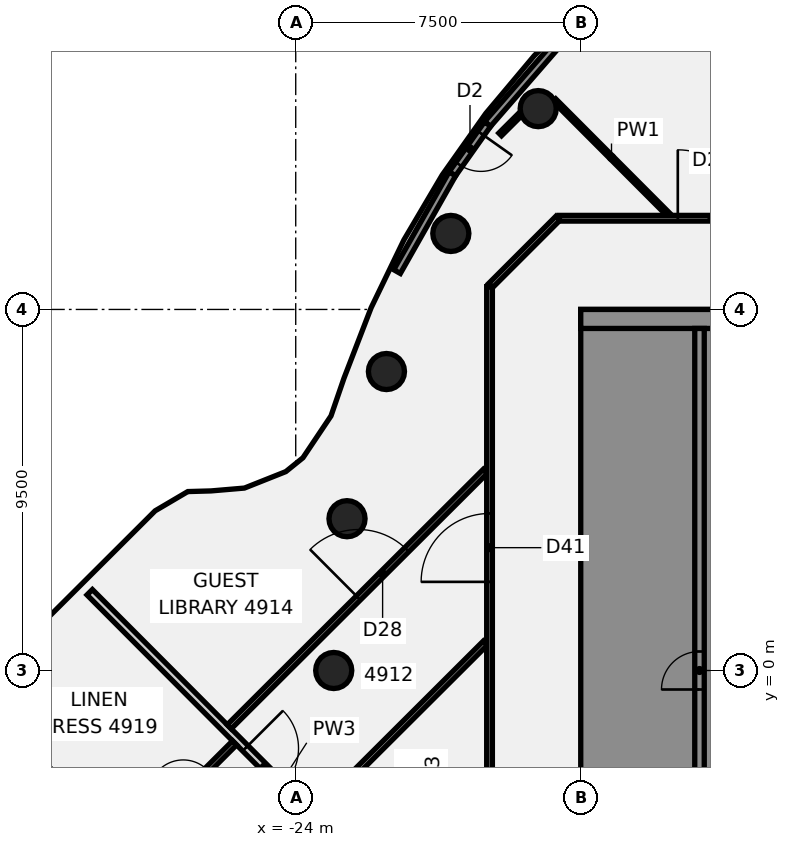
"""IFC4 building model, lengths in metres.
Left out: names, types, materials, properties, quantities, classifications, styles, units other than length and angle.
Written with IfcOpenShell. Run it as: python <this file> out.ifc"""

import sys

from ifc_helpers import new_model, si_unit, direction, frame, frame_2d, origin, origin_2d, place, context, subcontext, project, spatial, polyline, rectangle, circle, outline, extrude, element, fill, save


model = new_model("IFC4")
c1 = context("Model", 3, precision=1e-05, world=origin(), true_north=direction((0.0, 1.0)))
c2 = subcontext(c1, "Body", "Model", "MODEL_VIEW")
j1 = project(units=[si_unit("LENGTHUNIT", "METRE"), si_unit("PLANEANGLEUNIT", "RADIAN")], contexts=[c1])
p1 = place(None, origin())
s1 = spatial("IfcSite", under=j1, at=p1, CompositionType="ELEMENT")
p2 = place(p1, origin())
s2 = spatial("IfcBuilding", under=s1, at=p2, CompositionType="ELEMENT")
p3 = place(p2, frame((0.0, 0.0, 196.9)))
s3 = spatial("IfcBuildingStorey", under=s2, at=p3, CompositionType="ELEMENT", Elevation=196.9)
for number, where, z_axis, x_axis in (
    (1, (-17.619, 14.784, -0.14), (0.0, 0.0, 1.0), (1.0, 0.0, 0.0)),
    (2, (-19.919, 11.5, -0.14), (0.0, 0.0, 1.0), (1.0, 0.0, 0.0)),
    (3, (-21.613, 7.866, -0.14), (0.0, 0.0, 1.0), (1.0, 0.0, 0.0)),
    (4, (-22.651, 3.994, -0.14), (0.0, 0.0, 1.0), (1.0, 0.0, 0.0)),
    (5, (-23.0, 0.0, -0.14), (0.0, 0.0, 1.0), (1.0, 0.0, 0.0)),
):
    element("IfcColumn", number, at=place(p3, frame(where, z_axis=z_axis, x_axis=x_axis)), inside=s3, PredefinedType="COLUMN", context=c2, shape_type="SweptSolid", body=[
        extrude(circle(Radius=0.475, at=origin_2d()), origin(), (0.0, 0.0, 1.0), 3.6),
    ])
p4 = place(p3, frame((-29.421, 2.059, 0.0), z_axis=(0.0, 0.0, 1.0), x_axis=(0.706204778192, -0.708007635029, 0.0)))
e6 = element("IfcWall", 6, at=p4, inside=s3, PredefinedType="PARTITIONING", context=c2, shape_type="SweptSolid", body=[
    extrude(rectangle(XDim=14.219, YDim=0.2, at=frame_2d((7.109, 0.0))), origin(), (0.0, 0.0, 1.0), 2.864),
])
p5 = place(p4, frame((5.799, 0.0, 0.0)))
e7 = element("IfcOpeningElement", 7, at=p5, cuts=e6, PredefinedType="OPENING", context=c2, shape_type="SweptSolid", body=[
    extrude(rectangle(XDim=1.4, YDim=2.1, at=frame_2d((0.7, 1.05))), frame((0.0, 0.11, 0.0), z_axis=(0.0, -1.0, 0.0), x_axis=(1.0, 0.0, 0.0)), (0.0, 0.0, 1.0), 0.22),
])
p6 = place(p3, frame((-17.193, 15.006, 0.0), z_axis=(0.0, 0.0, 1.0), x_axis=(0.706159706794, -0.708052588796, 0.0)))
e8 = element("IfcWall", 8, at=p6, inside=s3, PredefinedType="PARTITIONING", context=c2, shape_type="SweptSolid", body=[
    extrude(rectangle(XDim=4.256, YDim=0.1, at=frame_2d((2.128, 0.0))), origin(), (0.0, 0.0, 1.0), 2.864),
])
p7 = place(p3, frame((-17.065, 11.9, 0.0), z_axis=(0.0, 0.0, 1.0), x_axis=(1.0, 0.0, 0.0)))
e9 = element("IfcWall", 9, at=p7, inside=s3, PredefinedType="PARTITIONING", context=c2, shape_type="SweptSolid", body=[
    extrude(rectangle(XDim=34.165, YDim=0.15, at=frame_2d((17.083, 0.0))), origin(), (0.0, 0.0, 1.0), 2.864),
])
p8 = place(p7, frame((24.217, 0.0, 0.0)))
e10 = element("IfcOpeningElement", 10, at=p8, cuts=e9, PredefinedType="OPENING", context=c2, shape_type="SweptSolid", body=[
    extrude(rectangle(XDim=1.8, YDim=2.1, at=frame_2d((0.9, 1.05))), frame((0.0, 0.085, 0.0), z_axis=(0.0, -1.0, 0.0), x_axis=(1.0, 0.0, 0.0)), (0.0, 0.0, 1.0), 0.17),
])
p9 = place(p7, frame((8.819, 0.0, 0.0)))
e11 = element("IfcOpeningElement", 11, at=p9, cuts=e9, PredefinedType="OPENING", context=c2, shape_type="SweptSolid", body=[
    extrude(rectangle(XDim=1.8, YDim=2.1, at=frame_2d((0.9, 1.05))), frame((0.0, 0.085, 0.0), z_axis=(0.0, -1.0, 0.0), x_axis=(1.0, 0.0, 0.0)), (0.0, 0.0, 1.0), 0.17),
])
p10 = place(p7, frame((3.119, 0.0, 0.0)))
e12 = element("IfcOpeningElement", 12, at=p10, cuts=e9, PredefinedType="OPENING", context=c2, shape_type="SweptSolid", body=[
    extrude(rectangle(XDim=1.8, YDim=2.1, at=frame_2d((0.9, 1.05))), frame((0.0, 0.085, 0.0), z_axis=(0.0, -1.0, 0.0), x_axis=(1.0, 0.0, 0.0)), (0.0, 0.0, 1.0), 0.17),
])
p11 = place(p3, frame((-28.341, -4.63, 0.0), z_axis=(0.0, 0.0, 1.0), x_axis=(0.707960220413, 0.70625231066, 0.0)))
e13 = element("IfcWall", 13, at=p11, inside=s3, PredefinedType="PARTITIONING", context=c2, shape_type="SweptSolid", body=[
    extrude(rectangle(XDim=3.86, YDim=0.15, at=frame_2d((1.93, 0.0))), origin(), (0.0, 0.0, 1.0), 2.864),
])
p12 = place(p11, frame((1.95, 0.0, 0.0)))
e14 = element("IfcOpeningElement", 14, at=p12, cuts=e13, PredefinedType="OPENING", context=c2, shape_type="SweptSolid", body=[
    extrude(rectangle(XDim=0.9, YDim=2.1, at=frame_2d((0.45, 1.05))), frame((0.0, 0.085, 0.0), z_axis=(0.0, -1.0, 0.0), x_axis=(1.0, 0.0, 0.0)), (0.0, 0.0, 1.0), 0.17),
])
p13 = place(p3, frame((-25.749, -1.48, 0.0), z_axis=(0.0, 0.0, 1.0), x_axis=(0.707978232656, 0.706234254398, 0.0)))
e15 = element("IfcWall", 15, at=p13, inside=s3, PredefinedType="PARTITIONING", context=c2, shape_type="SweptSolid", body=[
    extrude(rectangle(XDim=9.519, YDim=0.15, at=frame_2d((4.76, 0.0))), origin(), (0.0, 0.0, 1.0), 2.864),
])
p14 = place(p13, frame((4.8, 0.0, 0.0)))
e16 = element("IfcOpeningElement", 16, at=p14, cuts=e15, PredefinedType="OPENING", context=c2, shape_type="SweptSolid", body=[
    extrude(rectangle(XDim=1.8, YDim=2.1, at=frame_2d((0.9, 1.05))), frame((0.0, 0.085, 0.0), z_axis=(0.0, -1.0, 0.0), x_axis=(1.0, 0.0, 0.0)), (0.0, 0.0, 1.0), 0.17),
])
p15 = place(p3, frame((-23.49, -3.745, 0.0), z_axis=(0.0, 0.0, 1.0), x_axis=(0.708089983703, 0.706122209663, 0.0)))
e17 = element("IfcWall", 17, at=p15, inside=s3, PredefinedType="PARTITIONING", context=c2, shape_type="SweptSolid", body=[
    extrude(rectangle(XDim=6.328, YDim=0.15, at=frame_2d((3.164, 0.0))), origin(), (0.0, 0.0, 1.0), 2.864),
])
p16 = place(p3, frame((-18.62, 14.106, 0.0), z_axis=(0.0, 0.0, 1.0), x_axis=(0.708047707123, 0.706164601519, 0.0)))
e18 = element("IfcWall", 18, at=p16, inside=s3, PredefinedType="PARTITIONING", context=c2, shape_type="SweptSolid", body=[
    extrude(rectangle(XDim=0.778, YDim=0.1, at=frame_2d((0.389, 0.0))), origin(), (0.0, 0.0, 1.0), 2.864),
])
p17 = place(p3, frame((-18.872, 10.128, 0.0), z_axis=(0.0, 0.0, 1.0), x_axis=(0.707106781187, 0.707106781187, 0.0)))
e19 = element("IfcWall", 19, at=p17, inside=s3, PredefinedType="PARTITIONING", context=c2, shape_type="SweptSolid", body=[
    extrude(rectangle(XDim=2.505, YDim=0.15, at=frame_2d((1.253, 0.0))), origin(), (0.0, 0.0, 1.0), 2.864),
])
p18 = place(p3, frame((-18.9, -10.1, 0.0), z_axis=(0.0, 0.0, 1.0), x_axis=(0.0, 1.0, 0.0)))
e20 = element("IfcWall", 20, at=p18, inside=s3, PredefinedType="PARTITIONING", context=c2, shape_type="SweptSolid", body=[
    extrude(rectangle(XDim=20.2, YDim=0.15, at=frame_2d((10.1, 0.0))), origin(), (0.0, 0.0, 1.0), 2.864),
])
p19 = place(p18, frame((12.432, 0.0, 0.0)))
e21 = element("IfcOpeningElement", 21, at=p19, cuts=e20, PredefinedType="OPENING", context=c2, shape_type="SweptSolid", body=[
    extrude(rectangle(XDim=1.8, YDim=2.1, at=frame_2d((0.9, 1.05))), frame((0.0, 0.085, 0.0), z_axis=(0.0, -1.0, 0.0), x_axis=(1.0, 0.0, 0.0)), (0.0, 0.0, 1.0), 0.17),
])
p20 = place(p18, frame((5.158, 0.0, 0.0)))
e22 = element("IfcOpeningElement", 22, at=p20, cuts=e20, PredefinedType="OPENING", context=c2, shape_type="SweptSolid", body=[
    extrude(rectangle(XDim=0.9, YDim=2.1, at=frame_2d((0.45, 1.05))), frame((0.0, 0.085, 0.0), z_axis=(0.0, -1.0, 0.0), x_axis=(1.0, 0.0, 0.0)), (0.0, 0.0, 1.0), 0.17),
])
p21 = place(p3, frame((-17.011, 16.611, 0.0), z_axis=(0.0, 0.0, 1.0), x_axis=(-0.65596013701, -0.754795534336, 0.0)))
e23 = element("IfcWall", 23, at=p21, inside=s3, PredefinedType="SOLIDWALL", context=c2, shape_type="SweptSolid", body=[
    extrude(rectangle(XDim=2.959, YDim=0.2, at=frame_2d((1.479, 0.0))), origin(), (0.0, 0.0, 1.0), 3.46),
])
p22 = place(p3, frame((-19.876, 13.071, 0.0), z_axis=(0.0, 0.0, 1.0), x_axis=(-0.492589967899, -0.870261525936, 0.0)))
e24 = element("IfcWall", 24, at=p22, inside=s3, PredefinedType="SOLIDWALL", context=c2, shape_type="SweptSolid", body=[
    extrude(rectangle(XDim=2.959, YDim=0.2, at=frame_2d((1.48, 0.0))), origin(), (0.0, 0.0, 1.0), 3.46),
])
p23 = place(p3, frame((-18.952, 14.377, 0.0), z_axis=(0.0, 0.0, 1.0), x_axis=(-0.57755153974, -0.816354223939, 0.0)))
e25 = element("IfcWall", 25, at=p23, inside=s3, PredefinedType="SOLIDWALL", context=c2, shape_type="SweptSolid", body=[
    extrude(rectangle(XDim=1.6, YDim=0.2, at=frame_2d((0.8, 0.0))), origin(), (0.0, 0.0, 1.0), 3.46),
])
p24 = place(p23, frame((0.3, 0.0, 0.0)))
e26 = element("IfcOpeningElement", 26, at=p24, cuts=e25, PredefinedType="OPENING", context=c2, shape_type="SweptSolid", body=[
    extrude(rectangle(XDim=1.0, YDim=2.4, at=frame_2d((0.5, 1.2))), frame((0.0, 0.11, 0.0), z_axis=(0.0, -1.0, 0.0), x_axis=(1.0, 0.0, 0.0)), (0.0, 0.0, 1.0), 0.22),
])
p25 = place(p3, origin())
e27 = element("IfcWall", 27, at=p25, inside=s3, PredefinedType="SHEAR", context=c2, shape_type="SweptSolid", body=[
    extrude(outline(polyline([(-13.5, -8.125), (-16.0, -8.125), (-16.0, -5.625), (-13.5, -5.625), (-13.5, -5.375), (-16.0, -5.375), (-16.0, 5.375), (-13.5, 5.375), (-13.5, 5.625), (-16.0, 5.625), (-16.0, 8.125), (-13.5, 8.125), (-13.5, 9.0), (-16.0, 9.0), (-16.5, 9.0), (-16.5, -9.0), (-16.0, -9.0), (-13.5, -9.0), (-13.5, -8.125)])), origin(), (0.0, 0.0, 1.0), 3.46),
])
p26 = place(p3, frame((-16.5, 9.25, 0.0), z_axis=(0.0, 0.0, 1.0), x_axis=(1.0, 0.0, 0.0)))
e28 = element("IfcWall", 28, at=p26, inside=s3, PredefinedType="SHEAR", context=c2, shape_type="SweptSolid", body=[
    extrude(rectangle(XDim=13.0, YDim=0.5, at=frame_2d((6.5, 0.0))), origin(), (0.0, 0.0, 1.0), 3.46),
])
p27 = place(p3, frame((-13.375, -9.0, 0.0), z_axis=(0.0, 0.0, 1.0), x_axis=(0.0, 1.0, 0.0)))
e29 = element("IfcWall", 29, at=p27, inside=s3, PredefinedType="SHEAR", context=c2, shape_type="SweptSolid", body=[
    extrude(rectangle(XDim=18.0, YDim=0.25, at=frame_2d((9.0, 0.0))), origin(), (0.0, 0.0, 1.0), 3.46),
])
p28 = place(p27, frame((1.425, 0.0, 0.0)))
e30 = element("IfcOpeningElement", 30, at=p28, cuts=e29, PredefinedType="OPENING", context=c2, shape_type="SweptSolid", body=[
    extrude(rectangle(XDim=1.4, YDim=2.1, at=frame_2d((0.7, 1.05))), frame((0.0, 0.135, 0.0), z_axis=(0.0, -1.0, 0.0), x_axis=(1.0, 0.0, 0.0)), (0.0, 0.0, 1.0), 0.27),
])
p29 = place(p27, frame((8.5, 0.0, 0.0)))
e31 = element("IfcOpeningElement", 31, at=p29, cuts=e29, PredefinedType="OPENING", context=c2, shape_type="SweptSolid", body=[
    extrude(rectangle(XDim=1.0, YDim=2.1, at=frame_2d((0.5, 1.05))), frame((0.0, 0.135, 0.0), z_axis=(0.0, -1.0, 0.0), x_axis=(1.0, 0.0, 0.0)), (0.0, 0.0, 1.0), 0.27),
])
p30 = place(p3, frame((-30.842, -2.322, -0.14), z_axis=(0.0, 0.0, 1.0), x_axis=(0.706190643127, -0.708021733818, 0.0)))
e32 = element("IfcWall", 32, at=p30, inside=s3, PredefinedType="SHEAR", context=c2, shape_type="SweptSolid", body=[
    extrude(rectangle(XDim=3.2, YDim=0.2, at=frame_2d((1.6, 0.0))), origin(), (0.0, 0.0, 1.0), 3.004),
])
p31 = place(p5, origin())
e33 = element("IfcDoor", 33, at=p31, inside=s3, OperationType="DOUBLE_DOOR_SINGLE_SWING", PredefinedType="DOOR", context=c2, shape_type="SweptSolid", body=[
    extrude(rectangle(XDim=1.4, YDim=2.1, at=frame_2d((0.7, 1.05))), frame((0.0, 0.025, 0.0), z_axis=(0.0, -1.0, 0.0), x_axis=(1.0, 0.0, 0.0)), (0.0, 0.0, 1.0), 0.05),
])
fill(e7, e33)
p32 = place(p10, origin())
e34 = element("IfcDoor", 34, at=p32, inside=s3, OperationType="DOUBLE_DOOR_SINGLE_SWING", PredefinedType="DOOR", context=c2, shape_type="SweptSolid", body=[
    extrude(rectangle(XDim=1.8, YDim=2.1, at=frame_2d((0.9, 1.05))), frame((0.0, 0.025, 0.0), z_axis=(0.0, -1.0, 0.0), x_axis=(1.0, 0.0, 0.0)), (0.0, 0.0, 1.0), 0.05),
])
fill(e12, e34)
p33 = place(p14, origin())
e35 = element("IfcDoor", 35, at=p33, inside=s3, OperationType="DOUBLE_DOOR_SINGLE_SWING", PredefinedType="DOOR", context=c2, shape_type="SweptSolid", body=[
    extrude(rectangle(XDim=1.8, YDim=2.1, at=frame_2d((0.9, 1.05))), frame((0.0, 0.025, 0.0), z_axis=(0.0, -1.0, 0.0), x_axis=(1.0, 0.0, 0.0)), (0.0, 0.0, 1.0), 0.05),
])
fill(e16, e35)
p34 = place(p19, frame((1.8, 0.0, 0.0), z_axis=(0.0, 0.0, 1.0), x_axis=(-1.0, 0.0, 0.0)))
e36 = element("IfcDoor", 36, at=p34, inside=s3, OperationType="DOUBLE_DOOR_SINGLE_SWING", PredefinedType="DOOR", context=c2, shape_type="SweptSolid", body=[
    extrude(rectangle(XDim=1.8, YDim=2.1, at=frame_2d((0.9, 1.05))), frame((0.0, 0.025, 0.0), z_axis=(0.0, -1.0, 0.0), x_axis=(1.0, 0.0, 0.0)), (0.0, 0.0, 1.0), 0.05),
])
fill(e21, e36)
p35 = place(p24, origin())
e37 = element("IfcDoor", 37, at=p35, inside=s3, OperationType="SINGLE_SWING_LEFT", PredefinedType="DOOR", context=c2, shape_type="SweptSolid", body=[
    extrude(rectangle(XDim=1.0, YDim=2.4, at=frame_2d((0.5, 1.2))), frame((0.0, 0.025, 0.0), z_axis=(0.0, -1.0, 0.0), x_axis=(1.0, 0.0, 0.0)), (0.0, 0.0, 1.0), 0.05),
])
fill(e26, e37)
p36 = place(p29, origin())
e38 = element("IfcDoor", 38, at=p36, inside=s3, OperationType="SINGLE_SWING_LEFT", PredefinedType="DOOR", context=c2, shape_type="SweptSolid", body=[
    extrude(rectangle(XDim=1.0, YDim=2.1, at=frame_2d((0.5, 1.05))), frame((0.0, 0.025, 0.0), z_axis=(0.0, -1.0, 0.0), x_axis=(1.0, 0.0, 0.0)), (0.0, 0.0, 1.0), 0.05),
])
fill(e31, e38)
save(model, sys.argv[1])
